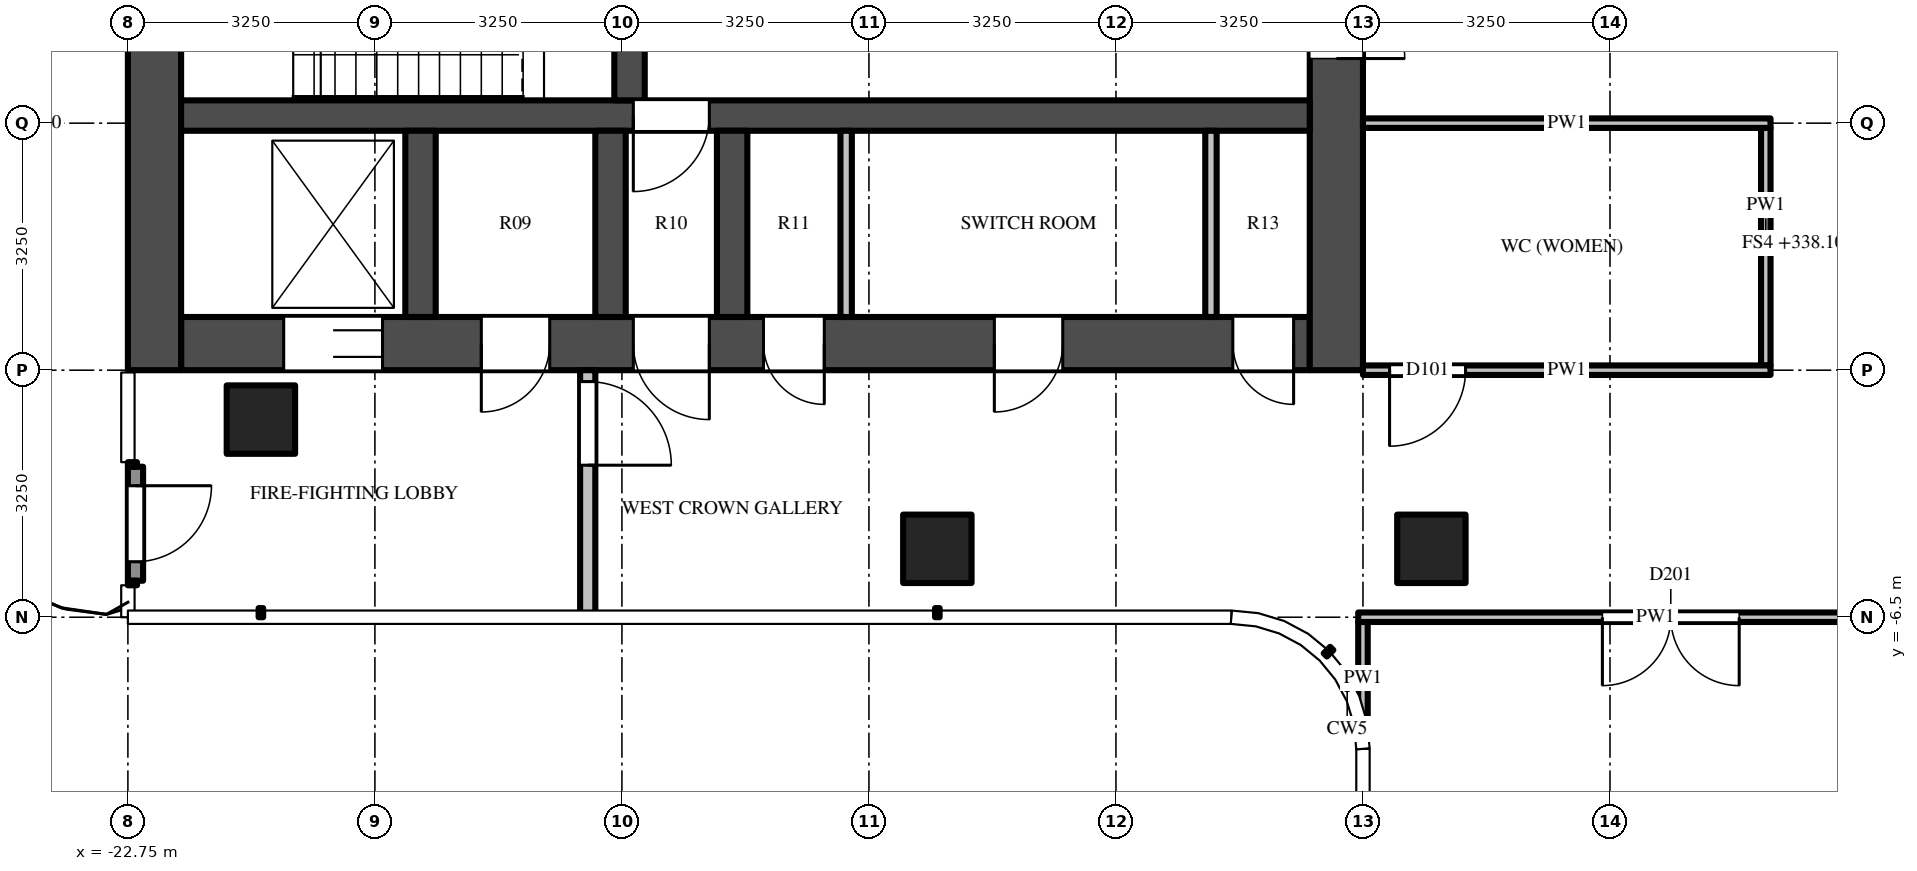
"""IFC4 building model, lengths in metres.
Left out: names, types, materials, properties, quantities, classifications, styles, units other than length and angle.
Written with IfcOpenShell. Run it as: python <this file> out.ifc"""

import sys

from ifc_helpers import new_model, si_unit, direction, frame, frame_2d, origin, origin_2d, place, context, subcontext, project, spatial, rectangle, extrude, source, transform, mapped, element, fill, save


model = new_model("IFC4")
c1 = context("Model", 3, precision=1e-05, world=origin(), true_north=direction((0.0, 1.0)))
c2 = subcontext(c1, "Body", "Model", "MODEL_VIEW")
j1 = project(units=[si_unit("LENGTHUNIT", "METRE"), si_unit("PLANEANGLEUNIT", "RADIAN")], contexts=[c1])
p1 = place(None, origin())
s1 = spatial("IfcSite", under=j1, at=p1, CompositionType="ELEMENT")
p2 = place(p1, origin())
s2 = spatial("IfcBuilding", under=s1, at=p2, CompositionType="ELEMENT")
p3 = place(p2, frame((0.0, 0.0, 338.1)))
s3 = spatial("IfcBuildingStorey", under=s2, at=p3, CompositionType="ELEMENT", Elevation=338.1)
m1 = source(origin(), c2, "Body", "SweptSolid", [
    extrude(rectangle(XDim=0.9, YDim=0.9, at=origin_2d()), origin(), (0.0, 0.0, 1.0), 4.0),
])
for number, where, z_axis, x_axis in (
    (1, (-5.6, -5.6, 0.0), (0.0, 0.0, 1.0), (1.0, 0.0, 0.0)),
    (2, (-12.1, -5.6, 0.0), (0.0, 0.0, 1.0), (1.0, 0.0, 0.0)),
    (3, (-21.0, -3.9, 0.0), (0.0, 0.0, 1.0), (1.0, 0.0, 0.0)),
):
    element("IfcColumn", number, at=place(p3, frame(where, z_axis=z_axis, x_axis=x_axis)), inside=s3, PredefinedType="COLUMN", context=c2, shape_type="MappedRepresentation", body=[
        mapped(m1, transform((0.0, 0.0, 0.0))),
    ])
m2 = source(origin(), c2, "Body", "SweptSolid", [
    extrude(rectangle(XDim=14.85, YDim=0.7, at=frame_2d((7.425, 0.0))), origin(), (0.0, 0.0, 1.0), 3.75),
])
p4 = place(p3, frame((-7.2, -2.9, 0.0), z_axis=(0.0, 0.0, 1.0), x_axis=(-1.0, 0.0, 0.0)))
e4 = element("IfcWall", 4, at=p4, inside=s3, PredefinedType="SHEAR", context=c2, shape_type="MappedRepresentation", body=[
    mapped(m2, transform((0.0, 0.0, 0.0))),
])
m3 = source(origin(), c2, "Body", "SweptSolid", [
    extrude(rectangle(XDim=1.3, YDim=2.1, at=frame_2d((0.65, 1.05))), frame((0.0, 0.36, 0.0), z_axis=(0.0, -1.0, 0.0), x_axis=(1.0, 0.0, 0.0)), (0.0, 0.0, 1.0), 0.72),
])
p5 = place(p4, frame((12.2, 0.0, 0.0)))
e5 = element("IfcOpeningElement", 5, at=p5, cuts=e4, PredefinedType="OPENING", context=c2, shape_type="MappedRepresentation", body=[
    mapped(m3, transform((0.0, 0.0, 0.0))),
])
m4 = source(origin(), c2, "Body", "SweptSolid", [
    extrude(rectangle(XDim=1.0, YDim=2.1, at=frame_2d((0.5, 1.05))), frame((0.0, 0.36, 0.0), z_axis=(0.0, -1.0, 0.0), x_axis=(1.0, 0.0, 0.0)), (0.0, 0.0, 1.0), 0.72),
])
p6 = place(p4, frame((7.9, 0.0, 0.0)))
e6 = element("IfcOpeningElement", 6, at=p6, cuts=e4, PredefinedType="OPENING", context=c2, shape_type="MappedRepresentation", body=[
    mapped(m4, transform((0.0, 0.0, 0.0))),
])
m5 = source(origin(), c2, "Body", "SweptSolid", [
    extrude(rectangle(XDim=0.8, YDim=2.1, at=frame_2d((0.4, 1.05))), frame((0.0, 0.36, 0.0), z_axis=(0.0, -1.0, 0.0), x_axis=(1.0, 0.0, 0.0)), (0.0, 0.0, 1.0), 0.72),
])
p7 = place(p4, frame((0.212, 0.0, 0.0)))
e7 = element("IfcOpeningElement", 7, at=p7, cuts=e4, PredefinedType="OPENING", context=c2, shape_type="MappedRepresentation", body=[
    mapped(m5, transform((0.0, 0.0, 0.0))),
])
m6 = source(origin(), c2, "Body", "SweptSolid", [
    extrude(rectangle(XDim=0.9, YDim=2.1, at=frame_2d((0.45, 1.05))), frame((0.0, 0.36, 0.0), z_axis=(0.0, -1.0, 0.0), x_axis=(1.0, 0.0, 0.0)), (0.0, 0.0, 1.0), 0.72),
])
p8 = place(p4, frame((3.25, 0.0, 0.0)))
e8 = element("IfcOpeningElement", 8, at=p8, cuts=e4, PredefinedType="OPENING", context=c2, shape_type="MappedRepresentation", body=[
    mapped(m6, transform((0.0, 0.0, 0.0))),
])
p9 = place(p4, frame((6.387, 0.0, 0.0)))
e9 = element("IfcOpeningElement", 9, at=p9, cuts=e4, PredefinedType="OPENING", context=c2, shape_type="MappedRepresentation", body=[
    mapped(m5, transform((0.0, 0.0, 0.0))),
])
p10 = place(p4, frame((10.0, 0.0, 0.0)))
e10 = element("IfcOpeningElement", 10, at=p10, cuts=e4, PredefinedType="OPENING", context=c2, shape_type="MappedRepresentation", body=[
    mapped(m6, transform((0.0, 0.0, 0.0))),
])
m7 = source(origin(), c2, "Body", "SweptSolid", [
    extrude(rectangle(XDim=9.05, YDim=0.7, at=frame_2d((4.525, 0.0))), origin(), (0.0, 0.0, 1.0), 3.75),
])
p11 = place(p3, frame((-6.85, 5.8, 0.0), z_axis=(0.0, 0.0, 1.0), x_axis=(0.0, -1.0, 0.0)))
e11 = element("IfcWall", 11, at=p11, inside=s3, PredefinedType="SHEAR", context=c2, shape_type="MappedRepresentation", body=[
    mapped(m7, transform((0.0, 0.0, 0.0))),
])
m8 = source(origin(), c2, "Body", "SweptSolid", [
    extrude(rectangle(XDim=1.8, YDim=2.1, at=frame_2d((0.9, 1.05))), frame((0.0, 0.36, 0.0), z_axis=(0.0, -1.0, 0.0), x_axis=(1.0, 0.0, 0.0)), (0.0, 0.0, 1.0), 0.72),
])
p12 = place(p11, frame((3.15, 0.0, 0.0)))
e12 = element("IfcOpeningElement", 12, at=p12, cuts=e11, PredefinedType="OPENING", context=c2, shape_type="MappedRepresentation", body=[
    mapped(m8, transform((0.0, 0.0, 0.0))),
])
p13 = place(p3, frame((-22.4, 5.8, 0.0), z_axis=(0.0, 0.0, 1.0), x_axis=(0.0, -1.0, 0.0)))
e13 = element("IfcWall", 13, at=p13, inside=s3, PredefinedType="SHEAR", context=c2, shape_type="MappedRepresentation", body=[
    mapped(m7, transform((0.0, 0.0, 0.0))),
])
m9 = source(origin(), c2, "Body", "SweptSolid", [
    extrude(rectangle(XDim=14.85, YDim=0.4, at=frame_2d((7.425, 0.0))), origin(), (0.0, 0.0, 1.0), 3.75),
])
p14 = place(p3, frame((-7.2, 0.1, 0.0), z_axis=(0.0, 0.0, 1.0), x_axis=(-1.0, 0.0, 0.0)))
e14 = element("IfcWall", 14, at=p14, inside=s3, PredefinedType="SHEAR", context=c2, shape_type="MappedRepresentation", body=[
    mapped(m9, transform((0.0, 0.0, 0.0))),
])
m10 = source(origin(), c2, "Body", "SweptSolid", [
    extrude(rectangle(XDim=1.0, YDim=2.1, at=frame_2d((0.5, 1.05))), frame((0.0, 0.21, 0.0), z_axis=(0.0, -1.0, 0.0), x_axis=(1.0, 0.0, 0.0)), (0.0, 0.0, 1.0), 0.42),
])
p15 = place(p14, frame((7.9, 0.0, 0.0)))
e15 = element("IfcOpeningElement", 15, at=p15, cuts=e14, PredefinedType="OPENING", context=c2, shape_type="MappedRepresentation", body=[
    mapped(m10, transform((0.0, 0.0, 0.0))),
])
m11 = source(origin(), c2, "Body", "SweptSolid", [
    extrude(rectangle(XDim=5.5, YDim=0.4, at=frame_2d((2.75, 0.0))), origin(), (0.0, 0.0, 1.0), 3.75),
])
p16 = place(p3, frame((-16.15, 5.8, 0.0), z_axis=(0.0, 0.0, 1.0), x_axis=(0.0, -1.0, 0.0)))
e16 = element("IfcWall", 16, at=p16, inside=s3, PredefinedType="SHEAR", context=c2, shape_type="MappedRepresentation", body=[
    mapped(m11, transform((0.0, 0.0, 0.0))),
])
m12 = source(origin(), c2, "Body", "SweptSolid", [
    extrude(rectangle(XDim=1.1, YDim=2.1, at=frame_2d((0.55, 1.05))), frame((0.0, 0.21, 0.0), z_axis=(0.0, -1.0, 0.0), x_axis=(1.0, 0.0, 0.0)), (0.0, 0.0, 1.0), 0.42),
])
p17 = place(p16, frame((0.725, 0.0, 0.0)))
e17 = element("IfcOpeningElement", 17, at=p17, cuts=e16, PredefinedType="OPENING", context=c2, shape_type="MappedRepresentation", body=[
    mapped(m12, transform((0.0, 0.0, 0.0))),
])
p18 = place(p16, frame((3.675, 0.0, 0.0)))
e18 = element("IfcOpeningElement", 18, at=p18, cuts=e16, PredefinedType="OPENING", context=c2, shape_type="MappedRepresentation", body=[
    mapped(m12, transform((0.0, 0.0, 0.0))),
])
m13 = source(origin(), c2, "Body", "SweptSolid", [
    extrude(rectangle(XDim=2.45, YDim=0.4, at=frame_2d((1.225, 0.0))), origin(), (0.0, 0.0, 1.0), 3.75),
])
for number, where, z_axis, x_axis in (
    (19, (-14.8, -0.1, 0.0), (0.0, 0.0, 1.0), (0.0, -1.0, 0.0)),
    (20, (-16.4, -0.1, 0.0), (0.0, 0.0, 1.0), (0.0, -1.0, 0.0)),
    (21, (-18.9, -0.1, 0.0), (0.0, 0.0, 1.0), (0.0, -1.0, 0.0)),
):
    element("IfcWall", number, at=place(p3, frame(where, z_axis=z_axis, x_axis=x_axis)), inside=s3, PredefinedType="SHEAR", context=c2, shape_type="MappedRepresentation", body=[
        mapped(m13, transform((0.0, 0.0, 0.0))),
    ])
m14 = source(origin(), c2, "Body", "SweptSolid", [
    extrude(rectangle(XDim=3.25, YDim=0.2, at=frame_2d((1.625, 0.0))), origin(), (0.0, 0.0, 1.0), 3.75),
])
p19 = place(p3, frame((-16.7, -3.25, 0.0), z_axis=(0.0, 0.0, 1.0), x_axis=(0.0, -1.0, 0.0)))
e22 = element("IfcWall", 22, at=p19, inside=s3, PredefinedType="PARTITIONING", context=c2, shape_type="MappedRepresentation", body=[
    mapped(m14, transform((0.0, 0.0, 0.0))),
])
m15 = source(origin(), c2, "Body", "SweptSolid", [
    extrude(rectangle(XDim=1.1, YDim=2.1, at=frame_2d((0.55, 1.05))), frame((0.0, 0.11, 0.0), z_axis=(0.0, -1.0, 0.0), x_axis=(1.0, 0.0, 0.0)), (0.0, 0.0, 1.0), 0.22),
])
p20 = place(p19, frame((0.15, 0.0, 0.0)))
e23 = element("IfcOpeningElement", 23, at=p20, cuts=e22, PredefinedType="OPENING", context=c2, shape_type="MappedRepresentation", body=[
    mapped(m15, transform((0.0, 0.0, 0.0))),
])
m16 = source(origin(), c2, "Body", "SweptSolid", [
    extrude(rectangle(XDim=2.45, YDim=0.15, at=frame_2d((1.225, 0.0))), origin(), (0.0, 0.0, 1.0), 3.75),
])
for number, where, z_axis, x_axis in (
    (24, (-8.5, -0.1, 0.0), (0.0, 0.0, 1.0), (0.0, -1.0, 0.0)),
    (25, (-13.3, -0.1, 0.0), (0.0, 0.0, 1.0), (0.0, -1.0, 0.0)),
):
    element("IfcWall", number, at=place(p3, frame(where, z_axis=z_axis, x_axis=x_axis)), inside=s3, PredefinedType="PARTITIONING", context=c2, shape_type="MappedRepresentation", body=[
        mapped(m16, transform((0.0, 0.0, 0.0))),
    ])
m17 = source(origin(), c2, "Body", "SweptSolid", [
    extrude(rectangle(XDim=1.5, YDim=0.2, at=frame_2d((0.75, 0.0))), origin(), (0.0, 0.0, 1.0), 3.75),
])
p21 = place(p3, frame((-22.65, -4.52, 0.0), z_axis=(0.0, 0.0, 1.0), x_axis=(0.0, -1.0, 0.0)))
e26 = element("IfcWall", 26, at=p21, inside=s3, PredefinedType="SOLIDWALL", context=c2, shape_type="MappedRepresentation", body=[
    mapped(m17, transform((0.0, 0.0, 0.0))),
])
m18 = source(origin(), c2, "Body", "SweptSolid", [
    extrude(rectangle(XDim=1.0, YDim=2.4, at=frame_2d((0.5, 1.2))), frame((0.0, 0.11, 0.0), z_axis=(0.0, -1.0, 0.0), x_axis=(1.0, 0.0, 0.0)), (0.0, 0.0, 1.0), 0.22),
])
p22 = place(p21, frame((0.25, 0.0, 0.0)))
e27 = element("IfcOpeningElement", 27, at=p22, cuts=e26, PredefinedType="OPENING", context=c2, shape_type="MappedRepresentation", body=[
    mapped(m18, transform((0.0, 0.0, 0.0))),
])
m19 = source(origin(), c2, "Body", "SweptSolid", [
    extrude(rectangle(XDim=1.469, YDim=0.125, at=frame_2d((0.734, 0.0))), origin(), (0.0, 0.0, 1.0), 3.75),
])
p23 = place(p3, frame((-6.5, -6.562, 0.0), z_axis=(0.0, 0.0, 1.0), x_axis=(0.0, -1.0, 0.0)))
e28 = element("IfcWall", 28, at=p23, inside=s3, PredefinedType="PARTITIONING", context=c2, shape_type="MappedRepresentation", body=[
    mapped(m19, transform((0.0, 0.0, 0.0))),
])
m20 = source(origin(), c2, "Body", "SweptSolid", [
    extrude(rectangle(XDim=3.125, YDim=0.125, at=frame_2d((1.562, 0.0))), origin(), (0.0, 0.0, 1.0), 3.118),
])
p24 = place(p3, frame((-1.2, -0.062, 0.0), z_axis=(0.0, 0.0, 1.0), x_axis=(0.0, -1.0, 0.0)))
e29 = element("IfcWall", 29, at=p24, inside=s3, PredefinedType="PARTITIONING", context=c2, shape_type="MappedRepresentation", body=[
    mapped(m20, transform((0.0, 0.0, 0.0))),
])
m21 = source(origin(), c2, "Body", "SweptSolid", [
    extrude(rectangle(XDim=7.825, YDim=0.125, at=frame_2d((3.913, 0.0))), origin(), (0.0, 0.0, 1.0), 2.83),
])
p25 = place(p3, frame((1.262, -6.5, 0.0), z_axis=(0.0, 0.0, 1.0), x_axis=(-1.0, 0.0, 0.0)))
e30 = element("IfcWall", 30, at=p25, inside=s3, PredefinedType="PARTITIONING", context=c2, shape_type="MappedRepresentation", body=[
    mapped(m21, transform((0.0, 0.0, 0.0))),
])
m22 = source(origin(), c2, "Body", "SweptSolid", [
    extrude(rectangle(XDim=1.8, YDim=2.1, at=frame_2d((0.9, 1.05))), frame((0.0, 0.073, 0.0), z_axis=(0.0, -1.0, 0.0), x_axis=(1.0, 0.0, 0.0)), (0.0, 0.0, 1.0), 0.145),
])
p26 = place(p25, frame((2.812, 0.0, 0.0)))
e31 = element("IfcOpeningElement", 31, at=p26, cuts=e30, PredefinedType="OPENING", context=c2, shape_type="MappedRepresentation", body=[
    mapped(m22, transform((0.0, 0.0, 0.0))),
])
m23 = source(origin(), c2, "Body", "SweptSolid", [
    extrude(rectangle(XDim=5.363, YDim=0.125, at=frame_2d((2.681, 0.0))), origin(), (0.0, 0.0, 1.0), 3.046),
])
p27 = place(p3, frame((-1.137, -3.25, 0.0), z_axis=(0.0, 0.0, 1.0), x_axis=(-1.0, 0.0, 0.0)))
e32 = element("IfcWall", 32, at=p27, inside=s3, PredefinedType="PARTITIONING", context=c2, shape_type="MappedRepresentation", body=[
    mapped(m23, transform((0.0, 0.0, 0.0))),
])
m24 = source(origin(), c2, "Body", "SweptSolid", [
    extrude(rectangle(XDim=1.0, YDim=2.1, at=frame_2d((0.5, 1.05))), frame((0.0, 0.073, 0.0), z_axis=(0.0, -1.0, 0.0), x_axis=(1.0, 0.0, 0.0)), (0.0, 0.0, 1.0), 0.145),
])
p28 = place(p27, frame((4.012, 0.0, 0.0)))
e33 = element("IfcOpeningElement", 33, at=p28, cuts=e32, PredefinedType="OPENING", context=c2, shape_type="MappedRepresentation", body=[
    mapped(m24, transform((0.0, 0.0, 0.0))),
])
p29 = place(p3, frame((-1.137, 0.0, 0.0), z_axis=(0.0, 0.0, 1.0), x_axis=(-1.0, 0.0, 0.0)))
e34 = element("IfcWall", 34, at=p29, inside=s3, PredefinedType="PARTITIONING", context=c2, shape_type="MappedRepresentation", body=[
    mapped(m23, transform((0.0, 0.0, 0.0))),
])
m25 = source(origin(), c2, "Body", "SweptSolid", [
    extrude(rectangle(XDim=1.3, YDim=2.1, at=frame_2d((0.65, 1.05))), frame((0.0, -0.275, 0.0), z_axis=(0.0, -1.0, 0.0), x_axis=(1.0, 0.0, 0.0)), (0.0, 0.0, 1.0), 0.05),
])
p30 = place(p5, origin())
e35 = element("IfcDoor", 35, at=p30, inside=s3, OperationType="DOUBLE_DOOR_SLIDING", PredefinedType="DOOR", context=c2, shape_type="MappedRepresentation", body=[
    mapped(m25, transform((0.0, 0.0, 0.0))),
])
fill(e5, e35)
m26 = source(origin(), c2, "Body", "SweptSolid", [
    extrude(rectangle(XDim=1.8, YDim=2.1, at=frame_2d((0.9, 1.05))), frame((0.0, -0.275, 0.0), z_axis=(0.0, -1.0, 0.0), x_axis=(1.0, 0.0, 0.0)), (0.0, 0.0, 1.0), 0.05),
])
p31 = place(p12, origin())
e36 = element("IfcDoor", 36, at=p31, inside=s3, OperationType="DOUBLE_DOOR_SINGLE_SWING", PredefinedType="DOOR", context=c2, shape_type="MappedRepresentation", body=[
    mapped(m26, transform((0.0, 0.0, 0.0))),
])
fill(e12, e36)
m27 = source(origin(), c2, "Body", "SweptSolid", [
    extrude(rectangle(XDim=1.0, YDim=2.1, at=frame_2d((0.5, 1.05))), frame((0.0, 0.025, 0.0), z_axis=(0.0, -1.0, 0.0), x_axis=(1.0, 0.0, 0.0)), (0.0, 0.0, 1.0), 0.05),
])
p32 = place(p15, origin())
e37 = element("IfcDoor", 37, at=p32, inside=s3, OperationType="SINGLE_SWING_RIGHT", PredefinedType="DOOR", context=c2, shape_type="MappedRepresentation", body=[
    mapped(m27, transform((0.0, 0.0, 0.0))),
])
fill(e15, e37)
m28 = source(origin(), c2, "Body", "SweptSolid", [
    extrude(rectangle(XDim=1.0, YDim=2.1, at=frame_2d((0.5, 1.05))), frame((0.0, -0.275, 0.0), z_axis=(0.0, -1.0, 0.0), x_axis=(1.0, 0.0, 0.0)), (0.0, 0.0, 1.0), 0.05),
])
p33 = place(p6, origin())
e38 = element("IfcDoor", 38, at=p33, inside=s3, OperationType="SINGLE_SWING_LEFT", PredefinedType="DOOR", context=c2, shape_type="MappedRepresentation", body=[
    mapped(m28, transform((0.0, 0.0, 0.0))),
])
fill(e6, e38)
m29 = source(origin(), c2, "Body", "SweptSolid", [
    extrude(rectangle(XDim=1.1, YDim=2.1, at=frame_2d((0.55, 1.05))), frame((0.0, 0.025, 0.0), z_axis=(0.0, -1.0, 0.0), x_axis=(1.0, 0.0, 0.0)), (0.0, 0.0, 1.0), 0.05),
])
p34 = place(p20, origin())
e39 = element("IfcDoor", 39, at=p34, inside=s3, OperationType="SINGLE_SWING_RIGHT", PredefinedType="DOOR", context=c2, shape_type="MappedRepresentation", body=[
    mapped(m29, transform((0.0, 0.0, 0.0))),
])
fill(e23, e39)
m30 = source(origin(), c2, "Body", "SweptSolid", [
    extrude(rectangle(XDim=0.8, YDim=2.1, at=frame_2d((0.4, 1.05))), frame((0.0, -0.275, 0.0), z_axis=(0.0, -1.0, 0.0), x_axis=(1.0, 0.0, 0.0)), (0.0, 0.0, 1.0), 0.05),
])
p35 = place(p7, origin())
e40 = element("IfcDoor", 40, at=p35, inside=s3, OperationType="SINGLE_SWING_LEFT", PredefinedType="DOOR", context=c2, shape_type="MappedRepresentation", body=[
    mapped(m30, transform((0.0, 0.0, 0.0))),
])
fill(e7, e40)
m31 = source(origin(), c2, "Body", "SweptSolid", [
    extrude(rectangle(XDim=0.9, YDim=2.1, at=frame_2d((0.45, 1.05))), frame((0.0, -0.275, 0.0), z_axis=(0.0, -1.0, 0.0), x_axis=(1.0, 0.0, 0.0)), (0.0, 0.0, 1.0), 0.05),
])
p36 = place(p8, origin())
e41 = element("IfcDoor", 41, at=p36, inside=s3, OperationType="SINGLE_SWING_RIGHT", PredefinedType="DOOR", context=c2, shape_type="MappedRepresentation", body=[
    mapped(m31, transform((0.0, 0.0, 0.0))),
])
fill(e8, e41)
p37 = place(p9, origin())
e42 = element("IfcDoor", 42, at=p37, inside=s3, OperationType="SINGLE_SWING_LEFT", PredefinedType="DOOR", context=c2, shape_type="MappedRepresentation", body=[
    mapped(m30, transform((0.0, 0.0, 0.0))),
])
fill(e9, e42)
p38 = place(p10, origin())
e43 = element("IfcDoor", 43, at=p38, inside=s3, OperationType="SINGLE_SWING_RIGHT", PredefinedType="DOOR", context=c2, shape_type="MappedRepresentation", body=[
    mapped(m31, transform((0.0, 0.0, 0.0))),
])
fill(e10, e43)
m32 = source(origin(), c2, "Body", "SweptSolid", [
    extrude(rectangle(XDim=1.0, YDim=2.4, at=frame_2d((0.5, 1.2))), frame((0.0, 0.025, 0.0), z_axis=(0.0, -1.0, 0.0), x_axis=(1.0, 0.0, 0.0)), (0.0, 0.0, 1.0), 0.05),
])
p39 = place(p22, origin())
e44 = element("IfcDoor", 44, at=p39, inside=s3, OperationType="SINGLE_SWING_LEFT", PredefinedType="DOOR", context=c2, shape_type="MappedRepresentation", body=[
    mapped(m32, transform((0.0, 0.0, 0.0))),
])
fill(e27, e44)
m33 = source(origin(), c2, "Body", "SweptSolid", [
    extrude(rectangle(XDim=1.8, YDim=2.1, at=frame_2d((0.9, 1.05))), frame((0.0, 0.025, 0.0), z_axis=(0.0, -1.0, 0.0), x_axis=(1.0, 0.0, 0.0)), (0.0, 0.0, 1.0), 0.05),
])
p40 = place(p26, origin())
e45 = element("IfcDoor", 45, at=p40, inside=s3, OperationType="DOUBLE_DOOR_SINGLE_SWING", PredefinedType="DOOR", context=c2, shape_type="MappedRepresentation", body=[
    mapped(m33, transform((0.0, 0.0, 0.0))),
])
fill(e31, e45)
p41 = place(p28, origin())
e46 = element("IfcDoor", 46, at=p41, inside=s3, OperationType="SINGLE_SWING_RIGHT", PredefinedType="DOOR", context=c2, shape_type="MappedRepresentation", body=[
    mapped(m27, transform((0.0, 0.0, 0.0))),
])
fill(e33, e46)
save(model, sys.argv[1])
